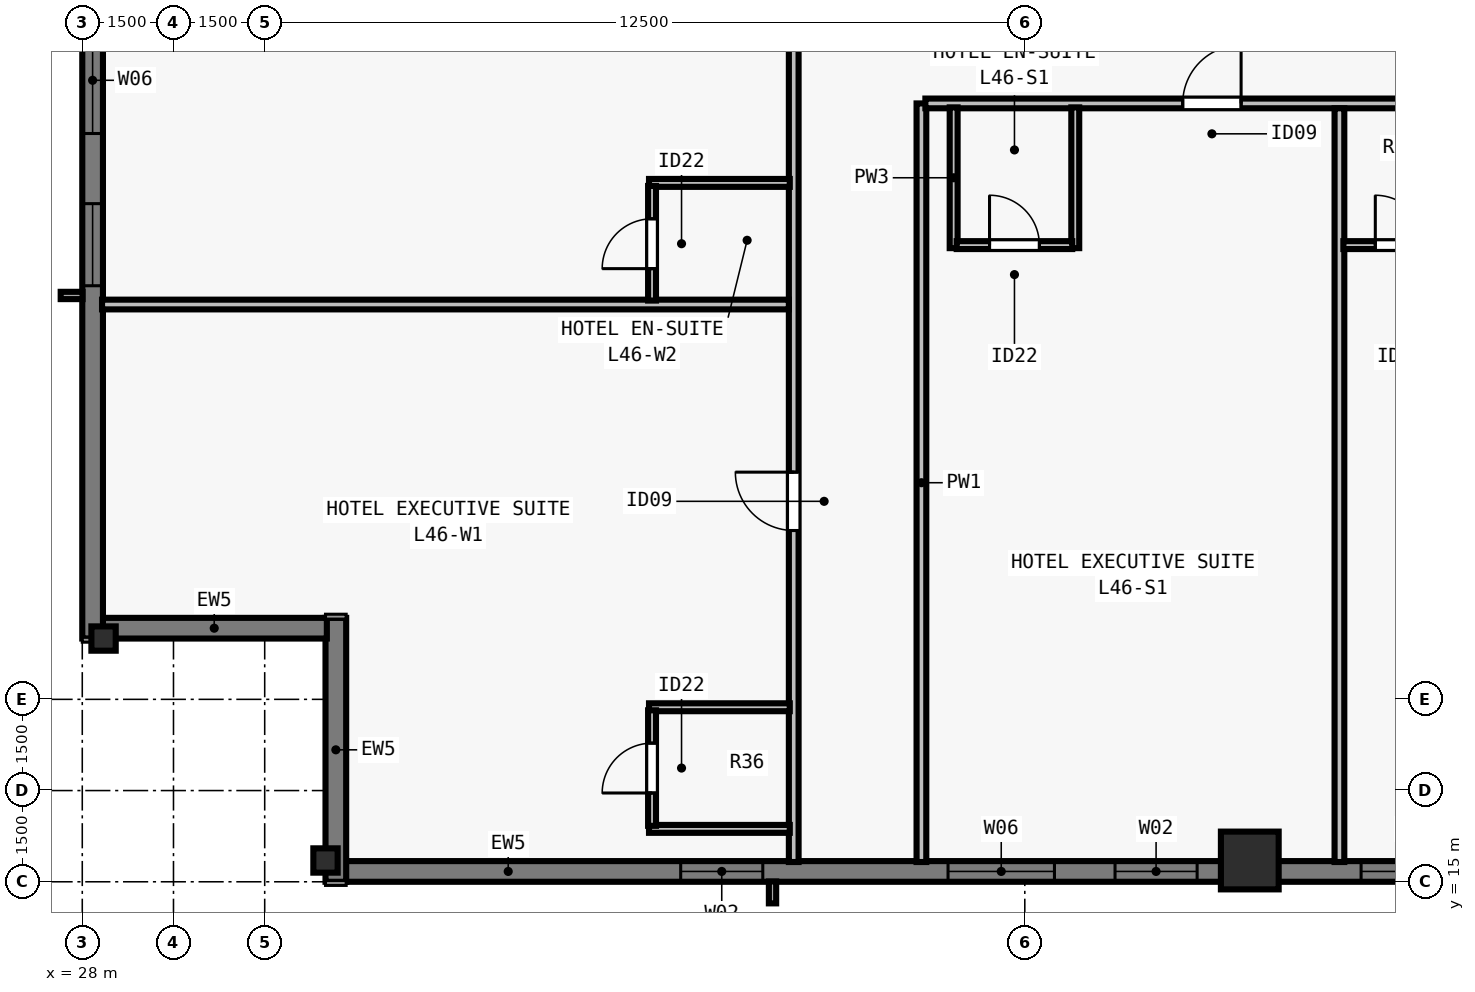
"""IFC4 building model, lengths in metres.
Left out: names, types, materials, properties, quantities, classifications, styles, units other than length and angle.
Written with IfcOpenShell. Run it as: python <this file> out.ifc"""

import sys

from ifc_helpers import new_model, si_unit, direction, frame, frame_2d, origin, origin_2d, place, context, subcontext, project, spatial, rectangle, i_section, extrude, element, fill, save


model = new_model("IFC4")
c1 = context("Model", 3, precision=1e-05, world=origin(), true_north=direction((0.0, 1.0)))
c2 = subcontext(c1, "Body", "Model", "MODEL_VIEW")
j1 = project(units=[si_unit("LENGTHUNIT", "METRE"), si_unit("PLANEANGLEUNIT", "RADIAN")], contexts=[c1])
p1 = place(None, origin())
s1 = spatial("IfcSite", under=j1, at=p1, CompositionType="ELEMENT")
p2 = place(p1, origin())
s2 = spatial("IfcBuilding", under=s1, at=p2, CompositionType="ELEMENT")
p3 = place(p2, frame((0.0, 0.0, 169.0)))
s3 = spatial("IfcBuildingStorey", under=s2, at=p3, CompositionType="ELEMENT", Elevation=169.0)
p4 = place(p3, frame((32.0, 15.35, 0.0), z_axis=(0.0, 0.0, 1.0), x_axis=(1.0, 0.0, 0.0)))
e1 = element("IfcColumn", 1, at=p4, inside=s3, PredefinedType="COLUMN", context=c2, shape_type="SweptSolid", body=[
    extrude(i_section(OverallWidth=0.4, OverallDepth=0.4, WebThickness=0.022, FlangeThickness=0.036, at=origin_2d()), origin(), (0.0, 0.0, 1.0), 3.5),
])
p5 = place(p3, frame((47.2, 15.35, 0.0), z_axis=(0.0, 0.0, 1.0), x_axis=(1.0, 0.0, 0.0)))
e2 = element("IfcColumn", 2, at=p5, inside=s3, PredefinedType="COLUMN", context=c2, shape_type="SweptSolid", body=[
    extrude(rectangle(XDim=0.95, YDim=0.95, at=origin_2d()), origin(), (0.0, 0.0, 1.0), 3.5),
])
p6 = place(p3, frame((28.35, 19.0, 0.0), z_axis=(0.0, 0.0, 1.0), x_axis=(0.0, 1.0, 0.0)))
e3 = element("IfcColumn", 3, at=p6, inside=s3, PredefinedType="COLUMN", context=c2, shape_type="SweptSolid", body=[
    extrude(i_section(OverallWidth=0.4, OverallDepth=0.4, WebThickness=0.022, FlangeThickness=0.036, at=origin_2d()), origin(), (0.0, 0.0, 1.0), 3.5),
])
p7 = place(p3, frame((59.0, 15.17, 0.0), z_axis=(0.0, 0.0, 1.0), x_axis=(-1.0, 0.0, 0.0)))
e4 = element("IfcWall", 4, at=p7, inside=s3, PredefinedType="SOLIDWALL", context=c2, shape_type="SweptSolid", body=[
    extrude(rectangle(XDim=26.682, YDim=0.34, at=frame_2d((13.341, 0.0))), origin(), (0.0, 0.0, 1.0), 3.28),
])
p8 = place(p7, frame((5.073, 0.0, 0.8)))
e5 = element("IfcOpeningElement", 5, at=p8, cuts=e4, PredefinedType="OPENING", context=c2, shape_type="SweptSolid", body=[
    extrude(rectangle(XDim=1.35, YDim=1.66, at=frame_2d((0.675, 0.83))), frame((0.0, 0.18, 0.0), z_axis=(0.0, -1.0, 0.0), x_axis=(1.0, 0.0, 0.0)), (0.0, 0.0, 1.0), 0.36),
])
p9 = place(p7, frame((8.219, 0.0, 0.8)))
e6 = element("IfcOpeningElement", 6, at=p9, cuts=e4, PredefinedType="OPENING", context=c2, shape_type="SweptSolid", body=[
    extrude(rectangle(XDim=1.75, YDim=1.66, at=frame_2d((0.875, 0.83))), frame((0.0, 0.18, 0.0), z_axis=(0.0, -1.0, 0.0), x_axis=(1.0, 0.0, 0.0)), (0.0, 0.0, 1.0), 0.36),
])
p10 = place(p7, frame((12.666, 0.0, 0.8)))
e7 = element("IfcOpeningElement", 7, at=p10, cuts=e4, PredefinedType="OPENING", context=c2, shape_type="SweptSolid", body=[
    extrude(rectangle(XDim=1.35, YDim=1.66, at=frame_2d((0.675, 0.83))), frame((0.0, 0.18, 0.0), z_axis=(0.0, -1.0, 0.0), x_axis=(1.0, 0.0, 0.0)), (0.0, 0.0, 1.0), 0.36),
])
p11 = place(p7, frame((15.012, 0.0, 0.8)))
e8 = element("IfcOpeningElement", 8, at=p11, cuts=e4, PredefinedType="OPENING", context=c2, shape_type="SweptSolid", body=[
    extrude(rectangle(XDim=1.75, YDim=1.66, at=frame_2d((0.875, 0.83))), frame((0.0, 0.18, 0.0), z_axis=(0.0, -1.0, 0.0), x_axis=(1.0, 0.0, 0.0)), (0.0, 0.0, 1.0), 0.36),
])
p12 = place(p7, frame((19.809, 0.0, 0.8)))
e9 = element("IfcOpeningElement", 9, at=p12, cuts=e4, PredefinedType="OPENING", context=c2, shape_type="SweptSolid", body=[
    extrude(rectangle(XDim=1.35, YDim=1.66, at=frame_2d((0.675, 0.83))), frame((0.0, 0.18, 0.0), z_axis=(0.0, -1.0, 0.0), x_axis=(1.0, 0.0, 0.0)), (0.0, 0.0, 1.0), 0.36),
])
p13 = place(p3, frame((32.17, 15.0, 0.0), z_axis=(0.0, 0.0, 1.0), x_axis=(0.0, 1.0, 0.0)))
e10 = element("IfcWall", 10, at=p13, inside=s3, PredefinedType="SOLIDWALL", context=c2, shape_type="SweptSolid", body=[
    extrude(rectangle(XDim=4.34, YDim=0.34, at=frame_2d((2.17, 0.0))), origin(), (0.0, 0.0, 1.0), 3.28),
])
p14 = place(p3, frame((32.022, 19.17, 0.0), z_axis=(0.0, 0.0, 1.0), x_axis=(-1.0, 0.0, 0.0)))
e11 = element("IfcWall", 11, at=p14, inside=s3, PredefinedType="SOLIDWALL", context=c2, shape_type="SweptSolid", body=[
    extrude(rectangle(XDim=3.704, YDim=0.34, at=frame_2d((1.852, 0.0))), origin(), (0.0, 0.0, 1.0), 3.28),
])
p15 = place(p3, frame((28.17, 19.0, 0.0), z_axis=(0.0, 0.0, 1.0), x_axis=(0.0, 1.0, 0.0)))
e12 = element("IfcWall", 12, at=p15, inside=s3, PredefinedType="SOLIDWALL", context=c2, shape_type="SweptSolid", body=[
    extrude(rectangle(XDim=39.682, YDim=0.34, at=frame_2d((19.841, 0.0))), origin(), (0.0, 0.0, 1.0), 3.28),
])
p16 = place(p15, frame((5.802, 0.0, 0.8)))
e13 = element("IfcOpeningElement", 13, at=p16, cuts=e12, PredefinedType="OPENING", context=c2, shape_type="SweptSolid", body=[
    extrude(rectangle(XDim=1.35, YDim=1.66, at=frame_2d((0.675, 0.83))), frame((0.0, 0.18, 0.0), z_axis=(0.0, -1.0, 0.0), x_axis=(1.0, 0.0, 0.0)), (0.0, 0.0, 1.0), 0.36),
])
p17 = place(p15, frame((8.305, 0.0, 0.8)))
e14 = element("IfcOpeningElement", 14, at=p17, cuts=e12, PredefinedType="OPENING", context=c2, shape_type="SweptSolid", body=[
    extrude(rectangle(XDim=1.75, YDim=1.66, at=frame_2d((0.875, 0.83))), frame((0.0, 0.18, 0.0), z_axis=(0.0, -1.0, 0.0), x_axis=(1.0, 0.0, 0.0)), (0.0, 0.0, 1.0), 0.36),
])
p18 = place(p15, frame((12.059, 0.0, 0.8)))
e15 = element("IfcOpeningElement", 15, at=p18, cuts=e12, PredefinedType="OPENING", context=c2, shape_type="SweptSolid", body=[
    extrude(rectangle(XDim=1.35, YDim=1.66, at=frame_2d((0.675, 0.83))), frame((0.0, 0.18, 0.0), z_axis=(0.0, -1.0, 0.0), x_axis=(1.0, 0.0, 0.0)), (0.0, 0.0, 1.0), 0.36),
])
p19 = place(p15, frame((16.262, 0.0, 0.8)))
e16 = element("IfcOpeningElement", 16, at=p19, cuts=e12, PredefinedType="OPENING", context=c2, shape_type="SweptSolid", body=[
    extrude(rectangle(XDim=1.75, YDim=1.66, at=frame_2d((0.875, 0.83))), frame((0.0, 0.18, 0.0), z_axis=(0.0, -1.0, 0.0), x_axis=(1.0, 0.0, 0.0)), (0.0, 0.0, 1.0), 0.36),
])
p20 = place(p15, frame((19.166, 0.0, 0.8)))
e17 = element("IfcOpeningElement", 17, at=p20, cuts=e12, PredefinedType="OPENING", context=c2, shape_type="SweptSolid", body=[
    extrude(rectangle(XDim=1.35, YDim=1.66, at=frame_2d((0.675, 0.83))), frame((0.0, 0.18, 0.0), z_axis=(0.0, -1.0, 0.0), x_axis=(1.0, 0.0, 0.0)), (0.0, 0.0, 1.0), 0.36),
])
p21 = place(p15, frame((22.07, 0.0, 0.8)))
e18 = element("IfcOpeningElement", 18, at=p21, cuts=e12, PredefinedType="OPENING", context=c2, shape_type="SweptSolid", body=[
    extrude(rectangle(XDim=1.75, YDim=1.66, at=frame_2d((0.875, 0.83))), frame((0.0, 0.18, 0.0), z_axis=(0.0, -1.0, 0.0), x_axis=(1.0, 0.0, 0.0)), (0.0, 0.0, 1.0), 0.36),
])
p22 = place(p15, frame((26.273, 0.0, 0.8)))
e19 = element("IfcOpeningElement", 19, at=p22, cuts=e12, PredefinedType="OPENING", context=c2, shape_type="SweptSolid", body=[
    extrude(rectangle(XDim=1.35, YDim=1.66, at=frame_2d((0.675, 0.83))), frame((0.0, 0.18, 0.0), z_axis=(0.0, -1.0, 0.0), x_axis=(1.0, 0.0, 0.0)), (0.0, 0.0, 1.0), 0.36),
])
p23 = place(p15, frame((29.627, 0.0, 0.8)))
e20 = element("IfcOpeningElement", 20, at=p23, cuts=e12, PredefinedType="OPENING", context=c2, shape_type="SweptSolid", body=[
    extrude(rectangle(XDim=1.75, YDim=1.66, at=frame_2d((0.875, 0.83))), frame((0.0, 0.18, 0.0), z_axis=(0.0, -1.0, 0.0), x_axis=(1.0, 0.0, 0.0)), (0.0, 0.0, 1.0), 0.36),
])
p24 = place(p15, frame((32.53, 0.0, 0.8)))
e21 = element("IfcOpeningElement", 21, at=p24, cuts=e12, PredefinedType="OPENING", context=c2, shape_type="SweptSolid", body=[
    extrude(rectangle(XDim=1.35, YDim=1.66, at=frame_2d((0.675, 0.83))), frame((0.0, 0.18, 0.0), z_axis=(0.0, -1.0, 0.0), x_axis=(1.0, 0.0, 0.0)), (0.0, 0.0, 1.0), 0.36),
])
p25 = place(p3, frame((39.7, 15.325, 0.0), z_axis=(0.0, 0.0, 1.0), x_axis=(0.0, 1.0, 0.0)))
e22 = element("IfcWall", 22, at=p25, inside=s3, PredefinedType="PARTITIONING", context=c2, shape_type="SweptSolid", body=[
    extrude(rectangle(XDim=47.35, YDim=0.16, at=frame_2d((23.675, 0.0))), origin(), (0.0, 0.0, 1.0), 2.555),
])
p26 = place(p25, frame((5.451, 0.0, 0.0)))
e23 = element("IfcOpeningElement", 23, at=p26, cuts=e22, PredefinedType="OPENING", context=c2, shape_type="SweptSolid", body=[
    extrude(rectangle(XDim=0.96, YDim=2.15, at=frame_2d((0.48, 1.075))), frame((0.0, 0.09, 0.0), z_axis=(0.0, -1.0, 0.0), x_axis=(1.0, 0.0, 0.0)), (0.0, 0.0, 1.0), 0.18),
])
p27 = place(p25, frame((14.783, 0.0, 0.0)))
e24 = element("IfcOpeningElement", 24, at=p27, cuts=e22, PredefinedType="OPENING", context=c2, shape_type="SweptSolid", body=[
    extrude(rectangle(XDim=0.96, YDim=2.15, at=frame_2d((0.48, 1.075))), frame((0.0, 0.09, 0.0), z_axis=(0.0, -1.0, 0.0), x_axis=(1.0, 0.0, 0.0)), (0.0, 0.0, 1.0), 0.18),
])
p28 = place(p25, frame((24.215, 0.0, 0.0)))
e25 = element("IfcOpeningElement", 25, at=p28, cuts=e22, PredefinedType="OPENING", context=c2, shape_type="SweptSolid", body=[
    extrude(rectangle(XDim=0.96, YDim=2.15, at=frame_2d((0.48, 1.075))), frame((0.0, 0.09, 0.0), z_axis=(0.0, -1.0, 0.0), x_axis=(1.0, 0.0, 0.0)), (0.0, 0.0, 1.0), 0.18),
])
p29 = place(p25, frame((33.647, 0.0, 0.0)))
e26 = element("IfcOpeningElement", 26, at=p29, cuts=e22, PredefinedType="OPENING", context=c2, shape_type="SweptSolid", body=[
    extrude(rectangle(XDim=0.96, YDim=2.15, at=frame_2d((0.48, 1.075))), frame((0.0, 0.09, 0.0), z_axis=(0.0, -1.0, 0.0), x_axis=(1.0, 0.0, 0.0)), (0.0, 0.0, 1.0), 0.18),
])
p30 = place(p25, frame((43.258, 0.0, 0.0)))
e27 = element("IfcOpeningElement", 27, at=p30, cuts=e22, PredefinedType="OPENING", context=c2, shape_type="SweptSolid", body=[
    extrude(rectangle(XDim=0.96, YDim=2.15, at=frame_2d((0.48, 1.075))), frame((0.0, 0.09, 0.0), z_axis=(0.0, -1.0, 0.0), x_axis=(1.0, 0.0, 0.0)), (0.0, 0.0, 1.0), 0.18),
])
p31 = place(p3, frame((41.8, 15.325, 0.0), z_axis=(0.0, 0.0, 1.0), x_axis=(0.0, 1.0, 0.0)))
e28 = element("IfcWall", 28, at=p31, inside=s3, PredefinedType="PARTITIONING", context=c2, shape_type="SweptSolid", body=[
    extrude(rectangle(XDim=12.475, YDim=0.16, at=frame_2d((6.238, 0.0))), origin(), (0.0, 0.0, 1.0), 3.28),
])
p32 = place(p3, frame((41.865, 27.8, 0.0), z_axis=(0.0, 0.0, 1.0), x_axis=(1.0, 0.0, 0.0)))
e29 = element("IfcWall", 29, at=p32, inside=s3, PredefinedType="PARTITIONING", context=c2, shape_type="SweptSolid", body=[
    extrude(rectangle(XDim=22.07, YDim=0.16, at=frame_2d((11.035, 0.0))), origin(), (0.0, 0.0, 1.0), 3.28),
])
p33 = place(p32, frame((4.232, 0.0, 0.0)))
e30 = element("IfcOpeningElement", 30, at=p33, cuts=e29, PredefinedType="OPENING", context=c2, shape_type="SweptSolid", body=[
    extrude(rectangle(XDim=0.96, YDim=2.15, at=frame_2d((0.48, 1.075))), frame((0.0, 0.09, 0.0), z_axis=(0.0, -1.0, 0.0), x_axis=(1.0, 0.0, 0.0)), (0.0, 0.0, 1.0), 0.18),
])
p34 = place(p32, frame((11.545, 0.0, 0.0)))
e31 = element("IfcOpeningElement", 31, at=p34, cuts=e29, PredefinedType="OPENING", context=c2, shape_type="SweptSolid", body=[
    extrude(rectangle(XDim=0.96, YDim=2.15, at=frame_2d((0.48, 1.075))), frame((0.0, 0.09, 0.0), z_axis=(0.0, -1.0, 0.0), x_axis=(1.0, 0.0, 0.0)), (0.0, 0.0, 1.0), 0.18),
])
p35 = place(p32, frame((19.168, 0.0, 0.0)))
e32 = element("IfcOpeningElement", 32, at=p35, cuts=e29, PredefinedType="OPENING", context=c2, shape_type="SweptSolid", body=[
    extrude(rectangle(XDim=0.96, YDim=2.15, at=frame_2d((0.48, 1.075))), frame((0.0, 0.09, 0.0), z_axis=(0.0, -1.0, 0.0), x_axis=(1.0, 0.0, 0.0)), (0.0, 0.0, 1.0), 0.18),
])
for number, where, z_axis, x_axis in (
    (33, (42.33, 25.42, 0.0), (0.0, 0.0, 1.0), (0.0, 1.0, 0.0)),
    (34, (44.33, 25.42, 0.0), (0.0, 0.0, 1.0), (0.0, 1.0, 0.0)),
):
    element("IfcWall", number, at=place(p3, frame(where, z_axis=z_axis, x_axis=x_axis)), inside=s3, PredefinedType="PLUMBINGWALL", context=c2, shape_type="SweptSolid", body=[
        extrude(rectangle(XDim=2.315, YDim=0.13, at=frame_2d((1.158, 0.0))), origin(), (0.0, 0.0, 1.0), 3.28),
    ])
p36 = place(p3, frame((42.38, 25.47, 0.0), z_axis=(0.0, 0.0, 1.0), x_axis=(1.0, 0.0, 0.0)))
e35 = element("IfcWall", 35, at=p36, inside=s3, PredefinedType="PLUMBINGWALL", context=c2, shape_type="SweptSolid", body=[
    extrude(rectangle(XDim=1.9, YDim=0.13, at=frame_2d((0.95, 0.0))), origin(), (0.0, 0.0, 1.0), 3.28),
])
p37 = place(p36, frame((0.54, 0.0, 0.0)))
e36 = element("IfcOpeningElement", 36, at=p37, cuts=e35, PredefinedType="OPENING", context=c2, shape_type="SweptSolid", body=[
    extrude(rectangle(XDim=0.82, YDim=2.1, at=frame_2d((0.41, 1.05))), frame((0.0, 0.075, 0.0), z_axis=(0.0, -1.0, 0.0), x_axis=(1.0, 0.0, 0.0)), (0.0, 0.0, 1.0), 0.15),
])
p38 = place(p3, frame((48.674, 15.325, 0.0), z_axis=(0.0, 0.0, 1.0), x_axis=(0.0, 1.0, 0.0)))
e37 = element("IfcWall", 37, at=p38, inside=s3, PredefinedType="PARTITIONING", context=c2, shape_type="SweptSolid", body=[
    extrude(rectangle(XDim=12.395, YDim=0.16, at=frame_2d((6.198, 0.0))), origin(), (0.0, 0.0, 1.0), 2.896),
])
p39 = place(p3, frame((48.739, 25.47, 0.0), z_axis=(0.0, 0.0, 1.0), x_axis=(1.0, 0.0, 0.0)))
e38 = element("IfcWall", 38, at=p39, inside=s3, PredefinedType="PLUMBINGWALL", context=c2, shape_type="SweptSolid", body=[
    extrude(rectangle(XDim=1.885, YDim=0.13, at=frame_2d((0.942, 0.0))), origin(), (0.0, 0.0, 1.0), 3.28),
])
p40 = place(p39, frame((0.525, 0.0, 0.0)))
e39 = element("IfcOpeningElement", 39, at=p40, cuts=e38, PredefinedType="OPENING", context=c2, shape_type="SweptSolid", body=[
    extrude(rectangle(XDim=0.82, YDim=2.1, at=frame_2d((0.41, 1.05))), frame((0.0, 0.075, 0.0), z_axis=(0.0, -1.0, 0.0), x_axis=(1.0, 0.0, 0.0)), (0.0, 0.0, 1.0), 0.15),
])
for number, where, z_axis, x_axis in (
    (40, (37.32, 15.87, 0.0), (0.0, 0.0, 1.0), (1.0, 0.0, 0.0)),
    (41, (37.32, 17.87, 0.0), (0.0, 0.0, 1.0), (1.0, 0.0, 0.0)),
):
    element("IfcWall", number, at=place(p3, frame(where, z_axis=z_axis, x_axis=x_axis)), inside=s3, PredefinedType="PLUMBINGWALL", context=c2, shape_type="SweptSolid", body=[
        extrude(rectangle(XDim=2.315, YDim=0.13, at=frame_2d((1.157, 0.0))), origin(), (0.0, 0.0, 1.0), 3.28),
    ])
p41 = place(p3, frame((37.37, 15.92, 0.0), z_axis=(0.0, 0.0, 1.0), x_axis=(0.0, 1.0, 0.0)))
e42 = element("IfcWall", 42, at=p41, inside=s3, PredefinedType="PLUMBINGWALL", context=c2, shape_type="SweptSolid", body=[
    extrude(rectangle(XDim=1.9, YDim=0.13, at=frame_2d((0.95, 0.0))), origin(), (0.0, 0.0, 1.0), 3.28),
])
p42 = place(p41, frame((0.54, 0.0, 0.0)))
e43 = element("IfcOpeningElement", 43, at=p42, cuts=e42, PredefinedType="OPENING", context=c2, shape_type="SweptSolid", body=[
    extrude(rectangle(XDim=0.82, YDim=2.1, at=frame_2d((0.41, 1.05))), frame((0.0, 0.075, 0.0), z_axis=(0.0, -1.0, 0.0), x_axis=(1.0, 0.0, 0.0)), (0.0, 0.0, 1.0), 0.15),
])
p43 = place(p3, frame((28.325, 24.493, 0.0), z_axis=(0.0, 0.0, 1.0), x_axis=(1.0, 0.0, 0.0)))
e44 = element("IfcWall", 44, at=p43, inside=s3, PredefinedType="PARTITIONING", context=c2, shape_type="SweptSolid", body=[
    extrude(rectangle(XDim=11.295, YDim=0.16, at=frame_2d((5.647, 0.0))), origin(), (0.0, 0.0, 1.0), 2.896),
])
p44 = place(p3, frame((37.32, 26.493, 0.0), z_axis=(0.0, 0.0, 1.0), x_axis=(1.0, 0.0, 0.0)))
e45 = element("IfcWall", 45, at=p44, inside=s3, PredefinedType="PLUMBINGWALL", context=c2, shape_type="SweptSolid", body=[
    extrude(rectangle(XDim=2.315, YDim=0.13, at=frame_2d((1.157, 0.0))), origin(), (0.0, 0.0, 1.0), 2.896),
])
p45 = place(p3, frame((37.37, 24.558, 0.0), z_axis=(0.0, 0.0, 1.0), x_axis=(0.0, 1.0, 0.0)))
e46 = element("IfcWall", 46, at=p45, inside=s3, PredefinedType="PLUMBINGWALL", context=c2, shape_type="SweptSolid", body=[
    extrude(rectangle(XDim=1.885, YDim=0.13, at=frame_2d((0.942, 0.0))), origin(), (0.0, 0.0, 1.0), 3.28),
])
p46 = place(p45, frame((0.525, 0.0, 0.0)))
e47 = element("IfcOpeningElement", 47, at=p46, cuts=e46, PredefinedType="OPENING", context=c2, shape_type="SweptSolid", body=[
    extrude(rectangle(XDim=0.82, YDim=2.1, at=frame_2d((0.41, 1.05))), frame((0.0, 0.075, 0.0), z_axis=(0.0, -1.0, 0.0), x_axis=(1.0, 0.0, 0.0)), (0.0, 0.0, 1.0), 0.15),
])
p47 = place(p9, origin())
e48 = element("IfcWindow", 48, at=p47, inside=s3, PartitioningType="SINGLE_PANEL", PredefinedType="WINDOW", context=c2, shape_type="SweptSolid", body=[
    extrude(rectangle(XDim=1.75, YDim=1.66, at=frame_2d((0.875, 0.83))), frame((0.0, -0.05, 0.0), z_axis=(0.0, -1.0, 0.0), x_axis=(1.0, 0.0, 0.0)), (0.0, 0.0, 1.0), 0.06),
])
fill(e6, e48)
p48 = place(p10, origin())
e49 = element("IfcWindow", 49, at=p48, inside=s3, PartitioningType="SINGLE_PANEL", PredefinedType="WINDOW", context=c2, shape_type="SweptSolid", body=[
    extrude(rectangle(XDim=1.35, YDim=1.66, at=frame_2d((0.675, 0.83))), frame((0.0, -0.05, 0.0), z_axis=(0.0, -1.0, 0.0), x_axis=(1.0, 0.0, 0.0)), (0.0, 0.0, 1.0), 0.06),
])
fill(e7, e49)
p49 = place(p11, origin())
e50 = element("IfcWindow", 50, at=p49, inside=s3, PartitioningType="SINGLE_PANEL", PredefinedType="WINDOW", context=c2, shape_type="SweptSolid", body=[
    extrude(rectangle(XDim=1.75, YDim=1.66, at=frame_2d((0.875, 0.83))), frame((0.0, -0.05, 0.0), z_axis=(0.0, -1.0, 0.0), x_axis=(1.0, 0.0, 0.0)), (0.0, 0.0, 1.0), 0.06),
])
fill(e8, e50)
p50 = place(p12, origin())
e51 = element("IfcWindow", 51, at=p50, inside=s3, PartitioningType="SINGLE_PANEL", PredefinedType="WINDOW", context=c2, shape_type="SweptSolid", body=[
    extrude(rectangle(XDim=1.35, YDim=1.66, at=frame_2d((0.675, 0.83))), frame((0.0, -0.05, 0.0), z_axis=(0.0, -1.0, 0.0), x_axis=(1.0, 0.0, 0.0)), (0.0, 0.0, 1.0), 0.06),
])
fill(e9, e51)
p51 = place(p16, origin())
e52 = element("IfcWindow", 52, at=p51, inside=s3, PartitioningType="SINGLE_PANEL", PredefinedType="WINDOW", context=c2, shape_type="SweptSolid", body=[
    extrude(rectangle(XDim=1.35, YDim=1.66, at=frame_2d((0.675, 0.83))), frame((0.0, -0.05, 0.0), z_axis=(0.0, -1.0, 0.0), x_axis=(1.0, 0.0, 0.0)), (0.0, 0.0, 1.0), 0.06),
])
fill(e13, e52)
p52 = place(p17, origin())
e53 = element("IfcWindow", 53, at=p52, inside=s3, PartitioningType="SINGLE_PANEL", PredefinedType="WINDOW", context=c2, shape_type="SweptSolid", body=[
    extrude(rectangle(XDim=1.75, YDim=1.66, at=frame_2d((0.875, 0.83))), frame((0.0, -0.05, 0.0), z_axis=(0.0, -1.0, 0.0), x_axis=(1.0, 0.0, 0.0)), (0.0, 0.0, 1.0), 0.06),
])
fill(e14, e53)
p53 = place(p37, origin())
e54 = element("IfcDoor", 54, at=p53, inside=s3, OperationType="SINGLE_SWING_LEFT", PredefinedType="DOOR", context=c2, shape_type="SweptSolid", body=[
    extrude(rectangle(XDim=0.82, YDim=2.1, at=frame_2d((0.41, 1.05))), frame((0.0, 0.025, 0.0), z_axis=(0.0, -1.0, 0.0), x_axis=(1.0, 0.0, 0.0)), (0.0, 0.0, 1.0), 0.05),
])
fill(e36, e54)
p54 = place(p33, origin())
e55 = element("IfcDoor", 55, at=p54, inside=s3, OperationType="SINGLE_SWING_RIGHT", PredefinedType="DOOR", context=c2, shape_type="SweptSolid", body=[
    extrude(rectangle(XDim=0.96, YDim=2.15, at=frame_2d((0.48, 1.075))), frame((0.0, 0.025, 0.0), z_axis=(0.0, -1.0, 0.0), x_axis=(1.0, 0.0, 0.0)), (0.0, 0.0, 1.0), 0.05),
])
fill(e30, e55)
p55 = place(p40, origin())
e56 = element("IfcDoor", 56, at=p55, inside=s3, OperationType="SINGLE_SWING_LEFT", PredefinedType="DOOR", context=c2, shape_type="SweptSolid", body=[
    extrude(rectangle(XDim=0.82, YDim=2.1, at=frame_2d((0.41, 1.05))), frame((0.0, 0.025, 0.0), z_axis=(0.0, -1.0, 0.0), x_axis=(1.0, 0.0, 0.0)), (0.0, 0.0, 1.0), 0.05),
])
fill(e39, e56)
p56 = place(p42, origin())
e57 = element("IfcDoor", 57, at=p56, inside=s3, OperationType="SINGLE_SWING_LEFT", PredefinedType="DOOR", context=c2, shape_type="SweptSolid", body=[
    extrude(rectangle(XDim=0.82, YDim=2.1, at=frame_2d((0.41, 1.05))), frame((0.0, 0.025, 0.0), z_axis=(0.0, -1.0, 0.0), x_axis=(1.0, 0.0, 0.0)), (0.0, 0.0, 1.0), 0.05),
])
fill(e43, e57)
p57 = place(p26, origin())
e58 = element("IfcDoor", 58, at=p57, inside=s3, OperationType="SINGLE_SWING_RIGHT", PredefinedType="DOOR", context=c2, shape_type="SweptSolid", body=[
    extrude(rectangle(XDim=0.96, YDim=2.15, at=frame_2d((0.48, 1.075))), frame((0.0, 0.025, 0.0), z_axis=(0.0, -1.0, 0.0), x_axis=(1.0, 0.0, 0.0)), (0.0, 0.0, 1.0), 0.05),
])
fill(e23, e58)
p58 = place(p46, origin())
e59 = element("IfcDoor", 59, at=p58, inside=s3, OperationType="SINGLE_SWING_LEFT", PredefinedType="DOOR", context=c2, shape_type="SweptSolid", body=[
    extrude(rectangle(XDim=0.82, YDim=2.1, at=frame_2d((0.41, 1.05))), frame((0.0, 0.025, 0.0), z_axis=(0.0, -1.0, 0.0), x_axis=(1.0, 0.0, 0.0)), (0.0, 0.0, 1.0), 0.05),
])
fill(e47, e59)
save(model, sys.argv[1])
